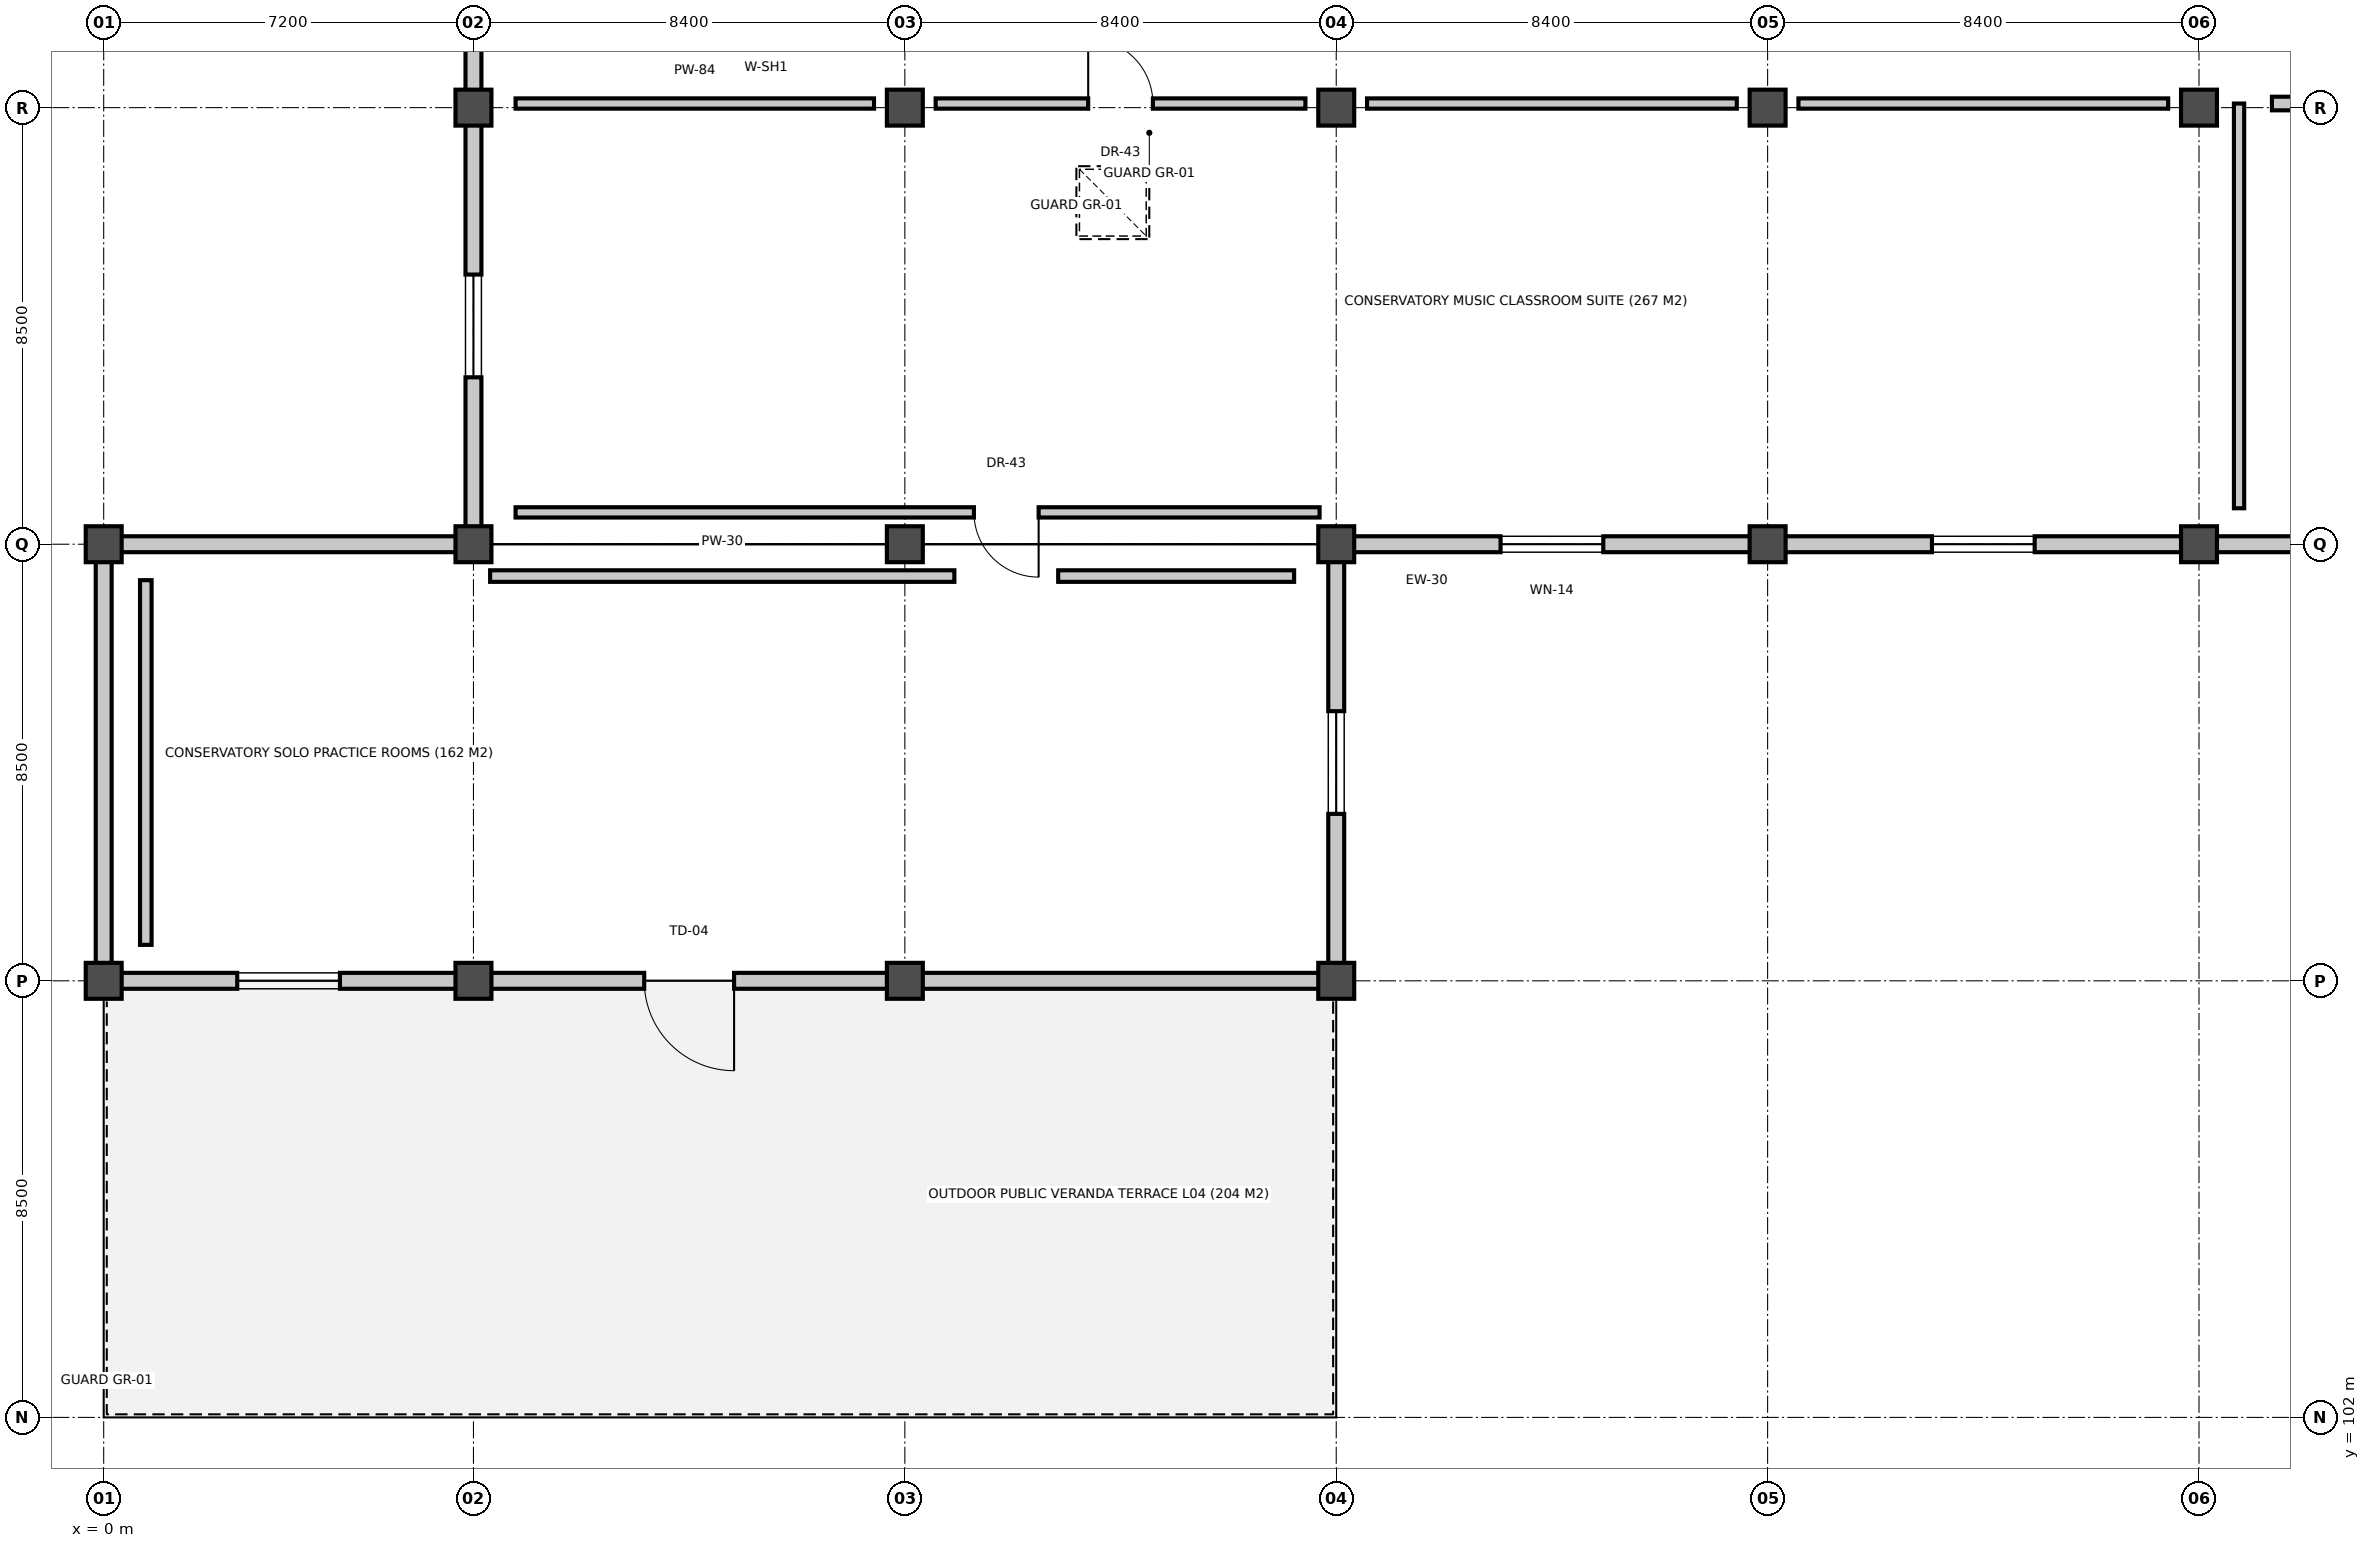
"""IFC4 building model, lengths in metres.
Left out: names, types, materials, properties, quantities, classifications, styles, units other than length and angle.
Written with IfcOpenShell. Run it as: python <this file> out.ifc"""

import sys

from ifc_helpers import new_model, si_unit, direction, frame, frame_2d, origin, origin_2d, place, context, subcontext, project, spatial, rectangle, extrude, element, fill, save


model = new_model("IFC4")
c1 = context("Model", 3, precision=1e-05, world=origin(), true_north=direction((0.0, 1.0)))
c2 = subcontext(c1, "Body", "Model", "MODEL_VIEW")
j1 = project(units=[si_unit("LENGTHUNIT", "METRE"), si_unit("PLANEANGLEUNIT", "RADIAN")], contexts=[c1])
p1 = place(None, origin())
s1 = spatial("IfcSite", under=j1, at=p1, CompositionType="ELEMENT")
p2 = place(p1, origin())
s2 = spatial("IfcBuilding", under=s1, at=p2, CompositionType="ELEMENT")
p3 = place(p2, frame((0.0, 0.0, 19.5)))
s3 = spatial("IfcBuildingStorey", under=s2, at=p3, CompositionType="ELEMENT", Elevation=19.5)
for number, where, z_axis, x_axis in (
    (1, (0.0, 110.5, 0.0), (0.0, 0.0, 1.0), (1.0, 0.0, 0.0)),
    (2, (0.0, 119.0, 0.0), (0.0, 0.0, 1.0), (1.0, 0.0, 0.0)),
    (3, (7.2, 110.5, 0.0), (0.0, 0.0, 1.0), (1.0, 0.0, 0.0)),
    (4, (7.2, 119.0, 0.0), (0.0, 0.0, 1.0), (1.0, 0.0, 0.0)),
    (5, (7.2, 127.5, 0.0), (0.0, 0.0, 1.0), (1.0, 0.0, 0.0)),
    (6, (15.6, 110.5, 0.0), (0.0, 0.0, 1.0), (1.0, 0.0, 0.0)),
    (7, (15.6, 119.0, 0.0), (0.0, 0.0, 1.0), (1.0, 0.0, 0.0)),
    (8, (15.6, 127.5, 0.0), (0.0, 0.0, 1.0), (1.0, 0.0, 0.0)),
    (9, (24.0, 110.5, 0.0), (0.0, 0.0, 1.0), (1.0, 0.0, 0.0)),
    (10, (24.0, 119.0, 0.0), (0.0, 0.0, 1.0), (1.0, 0.0, 0.0)),
    (11, (24.0, 127.5, 0.0), (0.0, 0.0, 1.0), (1.0, 0.0, 0.0)),
    (12, (32.4, 119.0, 0.0), (0.0, 0.0, 1.0), (1.0, 0.0, 0.0)),
    (13, (32.4, 127.5, 0.0), (0.0, 0.0, 1.0), (1.0, 0.0, 0.0)),
    (14, (40.8, 119.0, 0.0), (0.0, 0.0, 1.0), (1.0, 0.0, 0.0)),
    (15, (40.8, 127.5, 0.0), (0.0, 0.0, 1.0), (1.0, 0.0, 0.0)),
):
    element("IfcColumn", number, at=place(p3, frame(where, z_axis=z_axis, x_axis=x_axis)), inside=s3, PredefinedType="COLUMN", context=c2, shape_type="SweptSolid", body=[
        extrude(rectangle(XDim=0.7, YDim=0.7, at=origin_2d()), origin(), (0.0, 0.0, 1.0), 4.2),
    ])
p4 = place(p3, frame((32.07, 119.0, 0.0), z_axis=(0.0, 0.0, 1.0), x_axis=(-1.0, 0.0, 0.0)))
e16 = element("IfcWall", 16, at=p4, inside=s3, PredefinedType="SOLIDWALL", context=c2, shape_type="SweptSolid", body=[
    extrude(rectangle(XDim=7.74, YDim=0.31, at=frame_2d((3.87, 0.0))), origin(), (0.0, 0.0, 1.0), 3.304),
])
p5 = place(p4, frame((2.87, 0.0, 1.05)))
e17 = element("IfcOpeningElement", 17, at=p5, cuts=e16, PredefinedType="OPENING", context=c2, shape_type="SweptSolid", body=[
    extrude(rectangle(XDim=2.0, YDim=1.65, at=frame_2d((1.0, 0.825))), frame((0.0, 0.165, 0.0), z_axis=(0.0, -1.0, 0.0), x_axis=(1.0, 0.0, 0.0)), (0.0, 0.0, 1.0), 0.33),
])
p6 = place(p3, frame((40.47, 119.0, 0.0), z_axis=(0.0, 0.0, 1.0), x_axis=(-1.0, 0.0, 0.0)))
e18 = element("IfcWall", 18, at=p6, inside=s3, PredefinedType="SOLIDWALL", context=c2, shape_type="SweptSolid", body=[
    extrude(rectangle(XDim=7.74, YDim=0.31, at=frame_2d((3.87, 0.0))), origin(), (0.0, 0.0, 1.0), 3.204),
])
p7 = place(p6, frame((2.87, 0.0, 1.05)))
e19 = element("IfcOpeningElement", 19, at=p7, cuts=e18, PredefinedType="OPENING", context=c2, shape_type="SweptSolid", body=[
    extrude(rectangle(XDim=2.0, YDim=1.65, at=frame_2d((1.0, 0.825))), frame((0.0, 0.165, 0.0), z_axis=(0.0, -1.0, 0.0), x_axis=(1.0, 0.0, 0.0)), (0.0, 0.0, 1.0), 0.33),
])
p8 = place(p3, frame((48.87, 119.0, 0.0), z_axis=(0.0, 0.0, 1.0), x_axis=(-1.0, 0.0, 0.0)))
e20 = element("IfcWall", 20, at=p8, inside=s3, PredefinedType="SOLIDWALL", context=c2, shape_type="SweptSolid", body=[
    extrude(rectangle(XDim=7.74, YDim=0.31, at=frame_2d((3.87, 0.0))), origin(), (0.0, 0.0, 1.0), 3.231),
])
p9 = place(p8, frame((2.87, 0.0, 1.05)))
e21 = element("IfcOpeningElement", 21, at=p9, cuts=e20, PredefinedType="OPENING", context=c2, shape_type="SweptSolid", body=[
    extrude(rectangle(XDim=2.0, YDim=1.65, at=frame_2d((1.0, 0.825))), frame((0.0, 0.165, 0.0), z_axis=(0.0, -1.0, 0.0), x_axis=(1.0, 0.0, 0.0)), (0.0, 0.0, 1.0), 0.33),
])
p10 = place(p3, frame((24.0, 118.67, 0.0), z_axis=(0.0, 0.0, 1.0), x_axis=(0.0, -1.0, 0.0)))
e22 = element("IfcWall", 22, at=p10, inside=s3, PredefinedType="SOLIDWALL", context=c2, shape_type="SweptSolid", body=[
    extrude(rectangle(XDim=7.84, YDim=0.31, at=frame_2d((3.92, 0.0))), origin(), (0.0, 0.0, 1.0), 3.231),
])
p11 = place(p10, frame((2.92, 0.0, 1.05)))
e23 = element("IfcOpeningElement", 23, at=p11, cuts=e22, PredefinedType="OPENING", context=c2, shape_type="SweptSolid", body=[
    extrude(rectangle(XDim=2.0, YDim=1.65, at=frame_2d((1.0, 0.825))), frame((0.0, 0.165, 0.0), z_axis=(0.0, -1.0, 0.0), x_axis=(1.0, 0.0, 0.0)), (0.0, 0.0, 1.0), 0.33),
])
p12 = place(p3, frame((6.87, 110.5, 0.0), z_axis=(0.0, 0.0, 1.0), x_axis=(-1.0, 0.0, 0.0)))
e24 = element("IfcWall", 24, at=p12, inside=s3, PredefinedType="SOLIDWALL", context=c2, shape_type="SweptSolid", body=[
    extrude(rectangle(XDim=6.54, YDim=0.31, at=frame_2d((3.27, 0.0))), origin(), (0.0, 0.0, 1.0), 3.065),
])
p13 = place(p12, frame((2.27, 0.0, 1.05)))
e25 = element("IfcOpeningElement", 25, at=p13, cuts=e24, PredefinedType="OPENING", context=c2, shape_type="SweptSolid", body=[
    extrude(rectangle(XDim=2.0, YDim=1.65, at=frame_2d((1.0, 0.825))), frame((0.0, 0.165, 0.0), z_axis=(0.0, -1.0, 0.0), x_axis=(1.0, 0.0, 0.0)), (0.0, 0.0, 1.0), 0.33),
])
p14 = place(p3, frame((15.27, 110.5, 0.0), z_axis=(0.0, 0.0, 1.0), x_axis=(-1.0, 0.0, 0.0)))
e26 = element("IfcWall", 26, at=p14, inside=s3, PredefinedType="SOLIDWALL", context=c2, shape_type="SweptSolid", body=[
    extrude(rectangle(XDim=7.74, YDim=0.31, at=frame_2d((3.87, 0.0))), origin(), (0.0, 0.0, 1.0), 2.997),
])
p15 = place(p14, frame((2.995, 0.0, 0.0)))
e27 = element("IfcOpeningElement", 27, at=p15, cuts=e26, PredefinedType="OPENING", context=c2, shape_type="SweptSolid", body=[
    extrude(rectangle(XDim=1.75, YDim=2.3, at=frame_2d((0.875, 1.15))), frame((0.0, 0.165, 0.0), z_axis=(0.0, -1.0, 0.0), x_axis=(1.0, 0.0, 0.0)), (0.0, 0.0, 1.0), 0.33),
])
p16 = place(p3, frame((23.67, 110.5, 0.0), z_axis=(0.0, 0.0, 1.0), x_axis=(-1.0, 0.0, 0.0)))
e28 = element("IfcWall", 28, at=p16, inside=s3, PredefinedType="SOLIDWALL", context=c2, shape_type="SweptSolid", body=[
    extrude(rectangle(XDim=7.74, YDim=0.31, at=frame_2d((3.87, 0.0))), origin(), (0.0, 0.0, 1.0), 2.898),
])
p17 = place(p3, frame((0.0, 110.83, 0.0), z_axis=(0.0, 0.0, 1.0), x_axis=(0.0, 1.0, 0.0)))
e29 = element("IfcWall", 29, at=p17, inside=s3, PredefinedType="SOLIDWALL", context=c2, shape_type="SweptSolid", body=[
    extrude(rectangle(XDim=7.84, YDim=0.31, at=frame_2d((3.92, 0.0))), origin(), (0.0, 0.0, 1.0), 3.024),
])
p18 = place(p3, frame((0.33, 119.0, 0.0), z_axis=(0.0, 0.0, 1.0), x_axis=(1.0, 0.0, 0.0)))
e30 = element("IfcWall", 30, at=p18, inside=s3, PredefinedType="SOLIDWALL", context=c2, shape_type="SweptSolid", body=[
    extrude(rectangle(XDim=6.54, YDim=0.31, at=frame_2d((3.27, 0.0))), origin(), (0.0, 0.0, 1.0), 2.997),
])
p19 = place(p3, frame((7.2, 119.33, 0.0), z_axis=(0.0, 0.0, 1.0), x_axis=(0.0, 1.0, 0.0)))
e31 = element("IfcWall", 31, at=p19, inside=s3, PredefinedType="SOLIDWALL", context=c2, shape_type="SweptSolid", body=[
    extrude(rectangle(XDim=7.84, YDim=0.31, at=frame_2d((3.92, 0.0))), origin(), (0.0, 0.0, 1.0), 3.375),
])
p20 = place(p19, frame((2.92, 0.0, 1.05)))
e32 = element("IfcOpeningElement", 32, at=p20, cuts=e31, PredefinedType="OPENING", context=c2, shape_type="SweptSolid", body=[
    extrude(rectangle(XDim=2.0, YDim=1.65, at=frame_2d((1.0, 0.825))), frame((0.0, 0.165, 0.0), z_axis=(0.0, -1.0, 0.0), x_axis=(1.0, 0.0, 0.0)), (0.0, 0.0, 1.0), 0.33),
])
p21 = place(p3, frame((7.2, 127.83, 0.0), z_axis=(0.0, 0.0, 1.0), x_axis=(0.0, 1.0, 0.0)))
e33 = element("IfcWall", 33, at=p21, inside=s3, PredefinedType="SOLIDWALL", context=c2, shape_type="SweptSolid", body=[
    extrude(rectangle(XDim=7.84, YDim=0.31, at=frame_2d((3.92, 0.0))), origin(), (0.0, 0.0, 1.0), 3.231),
])
p22 = place(p21, frame((2.92, 0.0, 1.05)))
e34 = element("IfcOpeningElement", 34, at=p22, cuts=e33, PredefinedType="OPENING", context=c2, shape_type="SweptSolid", body=[
    extrude(rectangle(XDim=2.0, YDim=1.65, at=frame_2d((1.0, 0.825))), frame((0.0, 0.165, 0.0), z_axis=(0.0, -1.0, 0.0), x_axis=(1.0, 0.0, 0.0)), (0.0, 0.0, 1.0), 0.33),
])
p23 = place(p3, frame((8.02, 127.58, 0.0), z_axis=(0.0, 0.0, 1.0), x_axis=(1.0, 0.0, 0.0)))
e35 = element("IfcWall", 35, at=p23, inside=s3, PredefinedType="PARTITIONING", context=c2, shape_type="SweptSolid", body=[
    extrude(rectangle(XDim=6.98, YDim=0.2, at=frame_2d((3.49, 0.0))), origin(), (0.0, 0.0, 1.0), 2.86),
])
p24 = place(p3, frame((16.2, 127.58, 0.0), z_axis=(0.0, 0.0, 1.0), x_axis=(1.0, 0.0, 0.0)))
e36 = element("IfcWall", 36, at=p24, inside=s3, PredefinedType="PARTITIONING", context=c2, shape_type="SweptSolid", body=[
    extrude(rectangle(XDim=7.2, YDim=0.2, at=frame_2d((3.6, 0.0))), origin(), (0.0, 0.0, 1.0), 2.86),
])
p25 = place(p24, frame((2.97, 0.0, 0.0)))
e37 = element("IfcOpeningElement", 37, at=p25, cuts=e36, PredefinedType="OPENING", context=c2, shape_type="SweptSolid", body=[
    extrude(rectangle(XDim=1.26, YDim=2.28, at=frame_2d((0.63, 1.14))), frame((0.0, 0.11, 0.0), z_axis=(0.0, -1.0, 0.0), x_axis=(1.0, 0.0, 0.0)), (0.0, 0.0, 1.0), 0.22),
])
for number, where, z_axis, x_axis in (
    (38, (24.6, 127.58, 0.0), (0.0, 0.0, 1.0), (1.0, 0.0, 0.0)),
    (39, (33.0, 127.58, 0.0), (0.0, 0.0, 1.0), (1.0, 0.0, 0.0)),
):
    element("IfcWall", number, at=place(p3, frame(where, z_axis=z_axis, x_axis=x_axis)), inside=s3, PredefinedType="PARTITIONING", context=c2, shape_type="SweptSolid", body=[
        extrude(rectangle(XDim=7.2, YDim=0.2, at=frame_2d((3.6, 0.0))), origin(), (0.0, 0.0, 1.0), 2.86),
    ])
p26 = place(p3, frame((23.676, 119.62, 0.0), z_axis=(0.0, 0.0, 1.0), x_axis=(-1.0, 0.0, 0.0)))
e40 = element("IfcWall", 40, at=p26, inside=s3, PredefinedType="PARTITIONING", context=c2, shape_type="SweptSolid", body=[
    extrude(rectangle(XDim=15.656, YDim=0.2, at=frame_2d((7.828, 0.0))), origin(), (0.0, 0.0, 1.0), 2.86),
])
p27 = place(p26, frame((5.47, 0.0, 0.0)))
e41 = element("IfcOpeningElement", 41, at=p27, cuts=e40, PredefinedType="OPENING", context=c2, shape_type="SweptSolid", body=[
    extrude(rectangle(XDim=1.26, YDim=2.28, at=frame_2d((0.63, 1.14))), frame((0.0, 0.11, 0.0), z_axis=(0.0, -1.0, 0.0), x_axis=(1.0, 0.0, 0.0)), (0.0, 0.0, 1.0), 0.22),
])
p28 = place(p3, frame((41.58, 127.58, 0.0), z_axis=(0.0, 0.0, 1.0), x_axis=(0.0, -1.0, 0.0)))
e42 = element("IfcWall", 42, at=p28, inside=s3, PredefinedType="PARTITIONING", context=c2, shape_type="SweptSolid", body=[
    extrude(rectangle(XDim=7.88, YDim=0.2, at=frame_2d((3.94, 0.0))), origin(), (0.0, 0.0, 1.0), 2.86),
])
p29 = place(p3, frame((7.524, 118.38, 0.0), z_axis=(0.0, 0.0, 1.0), x_axis=(1.0, 0.0, 0.0)))
e43 = element("IfcWall", 43, at=p29, inside=s3, PredefinedType="PARTITIONING", context=c2, shape_type="SweptSolid", body=[
    extrude(rectangle(XDim=9.04, YDim=0.225, at=frame_2d((4.52, 0.0))), origin(), (0.0, 0.0, 1.0), 2.86),
])
p30 = place(p3, frame((18.586, 118.38, 0.0), z_axis=(0.0, 0.0, 1.0), x_axis=(1.0, 0.0, 0.0)))
e44 = element("IfcWall", 44, at=p30, inside=s3, PredefinedType="PARTITIONING", context=c2, shape_type="SweptSolid", body=[
    extrude(rectangle(XDim=4.594, YDim=0.225, at=frame_2d((2.297, 0.0))), origin(), (0.0, 0.0, 1.0), 2.86),
])
p31 = place(p3, frame((0.82, 111.2, 0.0), z_axis=(0.0, 0.0, 1.0), x_axis=(0.0, 1.0, 0.0)))
e45 = element("IfcWall", 45, at=p31, inside=s3, PredefinedType="PARTITIONING", context=c2, shape_type="SweptSolid", body=[
    extrude(rectangle(XDim=7.1, YDim=0.225, at=frame_2d((3.55, 0.0))), origin(), (0.0, 0.0, 1.0), 2.86),
])
p32 = place(p3, frame((42.22, 127.58, 0.0), z_axis=(0.0, 0.0, 1.0), x_axis=(1.0, 0.0, 0.0)))
e46 = element("IfcWall", 46, at=p32, inside=s3, PredefinedType="PARTITIONING", context=c2, shape_type="SweptSolid", body=[
    extrude(rectangle(XDim=6.38, YDim=0.265, at=frame_2d((3.19, 0.0))), origin(), (0.0, 0.0, 1.0), 2.86),
])
p33 = place(p32, frame((2.39, 0.0, 0.0)))
e47 = element("IfcOpeningElement", 47, at=p33, cuts=e46, PredefinedType="OPENING", context=c2, shape_type="SweptSolid", body=[
    extrude(rectangle(XDim=1.6, YDim=2.3, at=frame_2d((0.8, 1.15))), frame((0.0, 0.142, 0.0), z_axis=(0.0, -1.0, 0.0), x_axis=(1.0, 0.0, 0.0)), (0.0, 0.0, 1.0), 0.285),
])
p34 = place(p5, origin())
e48 = element("IfcWindow", 48, at=p34, inside=s3, PartitioningType="SINGLE_PANEL", PredefinedType="WINDOW", context=c2, shape_type="SweptSolid", body=[
    extrude(rectangle(XDim=2.0, YDim=1.65, at=frame_2d((1.0, 0.825))), frame((0.0, 0.03, 0.0), z_axis=(0.0, -1.0, 0.0), x_axis=(1.0, 0.0, 0.0)), (0.0, 0.0, 1.0), 0.06),
])
fill(e17, e48)
p35 = place(p7, origin())
e49 = element("IfcWindow", 49, at=p35, inside=s3, PartitioningType="SINGLE_PANEL", PredefinedType="WINDOW", context=c2, shape_type="SweptSolid", body=[
    extrude(rectangle(XDim=2.0, YDim=1.65, at=frame_2d((1.0, 0.825))), frame((0.0, 0.03, 0.0), z_axis=(0.0, -1.0, 0.0), x_axis=(1.0, 0.0, 0.0)), (0.0, 0.0, 1.0), 0.06),
])
fill(e19, e49)
p36 = place(p11, origin())
e50 = element("IfcWindow", 50, at=p36, inside=s3, PartitioningType="SINGLE_PANEL", PredefinedType="WINDOW", context=c2, shape_type="SweptSolid", body=[
    extrude(rectangle(XDim=2.0, YDim=1.65, at=frame_2d((1.0, 0.825))), frame((0.0, 0.03, 0.0), z_axis=(0.0, -1.0, 0.0), x_axis=(1.0, 0.0, 0.0)), (0.0, 0.0, 1.0), 0.06),
])
fill(e23, e50)
p37 = place(p13, origin())
e51 = element("IfcWindow", 51, at=p37, inside=s3, PartitioningType="SINGLE_PANEL", PredefinedType="WINDOW", context=c2, shape_type="SweptSolid", body=[
    extrude(rectangle(XDim=2.0, YDim=1.65, at=frame_2d((1.0, 0.825))), frame((0.0, 0.03, 0.0), z_axis=(0.0, -1.0, 0.0), x_axis=(1.0, 0.0, 0.0)), (0.0, 0.0, 1.0), 0.06),
])
fill(e25, e51)
p38 = place(p15, origin())
e52 = element("IfcDoor", 52, at=p38, inside=s3, OperationType="SINGLE_SWING_LEFT", PredefinedType="DOOR", context=c2, shape_type="SweptSolid", body=[
    extrude(rectangle(XDim=1.75, YDim=2.3, at=frame_2d((0.875, 1.15))), frame((0.0, 0.025, 0.0), z_axis=(0.0, -1.0, 0.0), x_axis=(1.0, 0.0, 0.0)), (0.0, 0.0, 1.0), 0.05),
])
fill(e27, e52)
p39 = place(p20, origin())
e53 = element("IfcWindow", 53, at=p39, inside=s3, PartitioningType="SINGLE_PANEL", PredefinedType="WINDOW", context=c2, shape_type="SweptSolid", body=[
    extrude(rectangle(XDim=2.0, YDim=1.65, at=frame_2d((1.0, 0.825))), frame((0.0, 0.03, 0.0), z_axis=(0.0, -1.0, 0.0), x_axis=(1.0, 0.0, 0.0)), (0.0, 0.0, 1.0), 0.06),
])
fill(e32, e53)
p40 = place(p25, origin())
e54 = element("IfcDoor", 54, at=p40, inside=s3, OperationType="SINGLE_SWING_LEFT", PredefinedType="DOOR", context=c2, shape_type="SweptSolid", body=[
    extrude(rectangle(XDim=1.26, YDim=2.28, at=frame_2d((0.63, 1.14))), frame((0.0, 0.025, 0.0), z_axis=(0.0, -1.0, 0.0), x_axis=(1.0, 0.0, 0.0)), (0.0, 0.0, 1.0), 0.05),
])
fill(e37, e54)
p41 = place(p27, origin())
e55 = element("IfcDoor", 55, at=p41, inside=s3, OperationType="SINGLE_SWING_LEFT", PredefinedType="DOOR", context=c2, shape_type="SweptSolid", body=[
    extrude(rectangle(XDim=1.26, YDim=2.28, at=frame_2d((0.63, 1.14))), frame((0.0, 0.025, 0.0), z_axis=(0.0, -1.0, 0.0), x_axis=(1.0, 0.0, 0.0)), (0.0, 0.0, 1.0), 0.05),
])
fill(e41, e55)
save(model, sys.argv[1])
